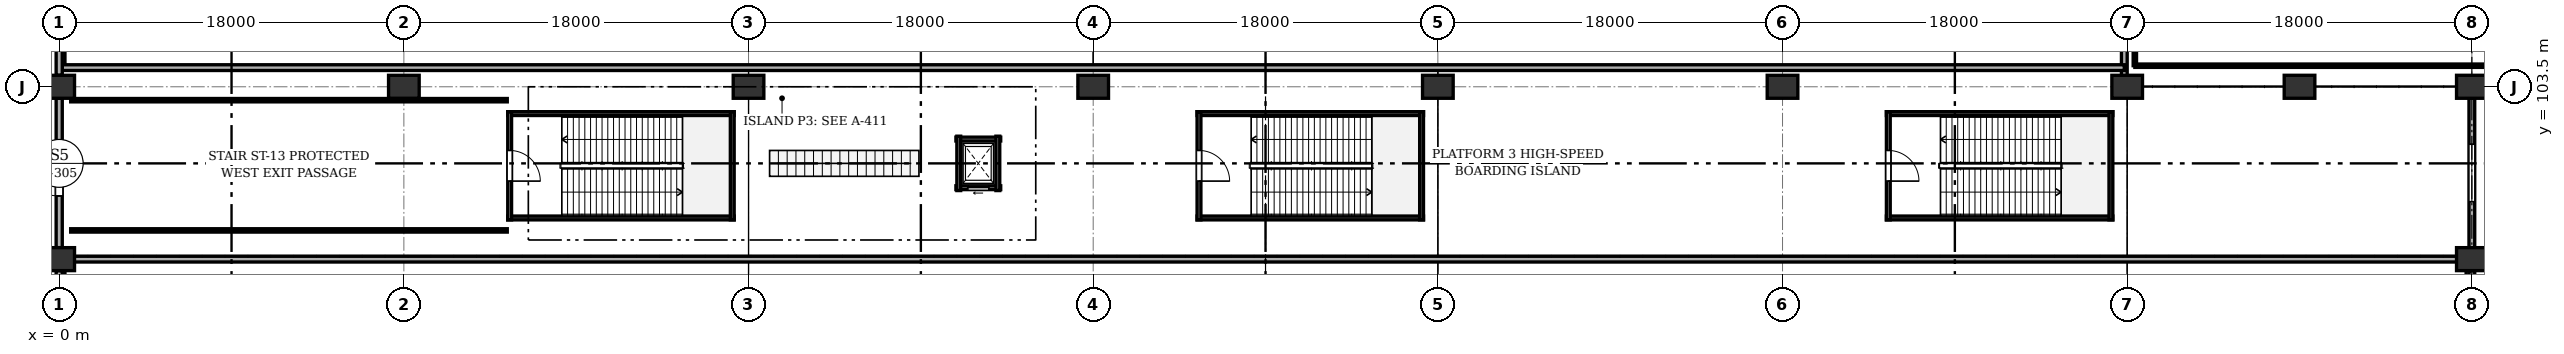
"""IFC4 building model, lengths in metres.
Left out: names, types, materials, properties, quantities, classifications, styles, units other than length and angle.
Written with IfcOpenShell. Run it as: python <this file> out.ifc"""

import sys

from ifc_helpers import new_model, si_unit, direction, frame, frame_2d, origin, origin_2d, place, context, subcontext, project, spatial, rectangle, extrude, element, fill, save


model = new_model("IFC4")
c1 = context("Model", 3, precision=1e-05, world=origin(), true_north=direction((0.0, 1.0)))
c2 = subcontext(c1, "Body", "Model", "MODEL_VIEW")
j1 = project(units=[si_unit("LENGTHUNIT", "METRE"), si_unit("PLANEANGLEUNIT", "RADIAN")], contexts=[c1])
p1 = place(None, origin())
s1 = spatial("IfcSite", under=j1, at=p1, CompositionType="ELEMENT")
p2 = place(p1, origin())
s2 = spatial("IfcBuilding", under=s1, at=p2, CompositionType="ELEMENT")
p3 = place(p2, origin())
s3 = spatial("IfcBuildingStorey", under=s2, at=p3, CompositionType="ELEMENT", Elevation=0.0)
for number, where, z_axis, x_axis in (
    (1, (0.0, 94.5, 0.0), (0.0, 0.0, 1.0), (1.0, 0.0, 0.0)),
    (2, (0.0, 103.5, 0.0), (0.0, 0.0, 1.0), (1.0, 0.0, 0.0)),
    (3, (18.0, 103.5, 0.0), (0.0, 0.0, 1.0), (1.0, 0.0, 0.0)),
    (4, (36.0, 103.5, 0.0), (0.0, 0.0, 1.0), (1.0, 0.0, 0.0)),
    (5, (54.0, 103.5, 0.0), (0.0, 0.0, 1.0), (1.0, 0.0, 0.0)),
    (6, (72.0, 103.5, 0.0), (0.0, 0.0, 1.0), (1.0, 0.0, 0.0)),
    (7, (90.0, 103.5, 0.0), (0.0, 0.0, 1.0), (1.0, 0.0, 0.0)),
    (8, (108.0, 103.5, 0.0), (0.0, 0.0, 1.0), (1.0, 0.0, 0.0)),
    (9, (117.0, 103.5, 0.0), (0.0, 0.0, 1.0), (1.0, 0.0, 0.0)),
    (10, (126.0, 94.5, 0.0), (0.0, 0.0, 1.0), (1.0, 0.0, 0.0)),
    (11, (126.0, 103.5, 0.0), (0.0, 0.0, 1.0), (1.0, 0.0, 0.0)),
):
    element("IfcColumn", number, at=place(p3, frame(where, z_axis=z_axis, x_axis=x_axis)), inside=s3, PredefinedType="COLUMN", context=c2, shape_type="SweptSolid", body=[
        extrude(rectangle(XDim=1.6, YDim=1.2, at=origin_2d()), origin(), (0.0, 0.0, 1.0), 6.6),
    ])
p4 = place(p3, frame((0.15, 76.5, -1.25), z_axis=(0.0, 0.0, 1.0), x_axis=(0.0, 1.0, 0.0)))
e12 = element("IfcWall", 12, at=p4, inside=s3, PredefinedType="SOLIDWALL", context=c2, shape_type="SweptSolid", body=[
    extrude(rectangle(XDim=18.0, YDim=0.3, at=frame_2d((9.0, 0.0))), origin(), (0.0, 0.0, 1.0), 0.52),
])
p5 = place(p3, frame((0.15, 104.5, -1.25), z_axis=(0.0, 0.0, 1.0), x_axis=(0.0, 1.0, 0.0)))
e13 = element("IfcWall", 13, at=p5, inside=s3, PredefinedType="SOLIDWALL", context=c2, shape_type="SweptSolid", body=[
    extrude(rectangle(XDim=4.0, YDim=0.3, at=frame_2d((2.0, 0.0))), origin(), (0.0, 0.0, 1.0), 1.23),
])
p6 = place(p3, frame((125.85, 76.5, -1.25), z_axis=(0.0, 0.0, 1.0), x_axis=(0.0, 1.0, 0.0)))
e14 = element("IfcWall", 14, at=p6, inside=s3, PredefinedType="SOLIDWALL", context=c2, shape_type="SweptSolid", body=[
    extrude(rectangle(XDim=18.0, YDim=0.3, at=frame_2d((9.0, 0.0))), origin(), (0.0, 0.0, 1.0), 0.52),
])
p7 = place(p3, frame((107.85, 103.5, -1.25), z_axis=(0.0, 0.0, 1.0), x_axis=(0.0, 1.0, 0.0)))
e15 = element("IfcWall", 15, at=p7, inside=s3, PredefinedType="SOLIDWALL", context=c2, shape_type="SweptSolid", body=[
    extrude(rectangle(XDim=5.0, YDim=0.3, at=frame_2d((2.5, 0.0))), origin(), (0.0, 0.0, 1.0), 2.5),
])
p8 = place(p3, frame((0.15, 94.5, -1.25), z_axis=(0.0, 0.0, 1.0), x_axis=(1.0, 0.0, 0.0)))
e16 = element("IfcWall", 16, at=p8, inside=s3, PredefinedType="SOLIDWALL", context=c2, shape_type="SweptSolid", body=[
    extrude(rectangle(XDim=125.7, YDim=0.3, at=frame_2d((62.85, 0.0))), origin(), (0.0, 0.0, 1.0), 0.87),
])
p9 = place(p3, frame((0.15, 104.5, -1.25), z_axis=(0.0, 0.0, 1.0), x_axis=(1.0, 0.0, 0.0)))
e17 = element("IfcWall", 17, at=p9, inside=s3, PredefinedType="SOLIDWALL", context=c2, shape_type="SweptSolid", body=[
    extrude(rectangle(XDim=107.7, YDim=0.3, at=frame_2d((53.85, 0.0))), origin(), (0.0, 0.0, 1.0), 0.87),
])
p10 = place(p3, frame((0.0, 86.1, 0.0), z_axis=(0.0, 0.0, 1.0), x_axis=(0.0, 1.0, 0.0)))
e18 = element("IfcWall", 18, at=p10, inside=s3, PredefinedType="SOLIDWALL", context=c2, shape_type="SweptSolid", body=[
    extrude(rectangle(XDim=7.8, YDim=0.32, at=frame_2d((3.9, 0.0))), origin(), (0.0, 0.0, 1.0), 5.495),
])
p11 = place(p10, frame((2.55, 0.0, 0.95)))
e19 = element("IfcOpeningElement", 19, at=p11, cuts=e18, PredefinedType="OPENING", context=c2, shape_type="SweptSolid", body=[
    extrude(rectangle(XDim=2.7, YDim=2.1, at=frame_2d((1.35, 1.05))), frame((0.0, 0.17, 0.0), z_axis=(0.0, -1.0, 0.0), x_axis=(1.0, 0.0, 0.0)), (0.0, 0.0, 1.0), 0.34),
])
p12 = place(p3, frame((0.0, 95.1, 0.0), z_axis=(0.0, 0.0, 1.0), x_axis=(0.0, 1.0, 0.0)))
e20 = element("IfcWall", 20, at=p12, inside=s3, PredefinedType="SOLIDWALL", context=c2, shape_type="SweptSolid", body=[
    extrude(rectangle(XDim=7.8, YDim=0.32, at=frame_2d((3.9, 0.0))), origin(), (0.0, 0.0, 1.0), 5.495),
])
p13 = place(p12, frame((2.7, 0.0, 0.0)))
e21 = element("IfcOpeningElement", 21, at=p13, cuts=e20, PredefinedType="OPENING", context=c2, shape_type="SweptSolid", body=[
    extrude(rectangle(XDim=2.4, YDim=2.5, at=frame_2d((1.2, 1.25))), frame((0.0, 0.17, 0.0), z_axis=(0.0, -1.0, 0.0), x_axis=(1.0, 0.0, 0.0)), (0.0, 0.0, 1.0), 0.34),
])
p14 = place(p3, frame((0.0, 104.1, 0.0), z_axis=(0.0, 0.0, 1.0), x_axis=(0.0, 1.0, 0.0)))
e22 = element("IfcWall", 22, at=p14, inside=s3, PredefinedType="SOLIDWALL", context=c2, shape_type="SweptSolid", body=[
    extrude(rectangle(XDim=12.45, YDim=0.32, at=frame_2d((6.225, 0.0))), origin(), (0.0, 0.0, 1.0), 5.495),
])
p15 = place(p14, frame((3.0, 0.0, 0.95)))
e23 = element("IfcOpeningElement", 23, at=p15, cuts=e22, PredefinedType="OPENING", context=c2, shape_type="SweptSolid", body=[
    extrude(rectangle(XDim=2.4, YDim=2.1, at=frame_2d((1.2, 1.05))), frame((0.0, 0.17, 0.0), z_axis=(0.0, -1.0, 0.0), x_axis=(1.0, 0.0, 0.0)), (0.0, 0.0, 1.0), 0.34),
])
p16 = place(p14, frame((7.15, 0.0, 0.95)))
e24 = element("IfcOpeningElement", 24, at=p16, cuts=e22, PredefinedType="OPENING", context=c2, shape_type="SweptSolid", body=[
    extrude(rectangle(XDim=2.1, YDim=2.0, at=frame_2d((1.05, 1.0))), frame((0.0, 0.17, 0.0), z_axis=(0.0, -1.0, 0.0), x_axis=(1.0, 0.0, 0.0)), (0.0, 0.0, 1.0), 0.34),
])
p17 = place(p3, frame((126.0, 93.9, 0.0), z_axis=(0.0, 0.0, 1.0), x_axis=(0.0, -1.0, 0.0)))
e25 = element("IfcWall", 25, at=p17, inside=s3, PredefinedType="SOLIDWALL", context=c2, shape_type="SweptSolid", body=[
    extrude(rectangle(XDim=7.8, YDim=0.3, at=frame_2d((3.9, 0.0))), origin(), (0.0, 0.0, 1.0), 5.495),
])
p18 = place(p17, frame((3.1, 0.0, 0.95)))
e26 = element("IfcOpeningElement", 26, at=p18, cuts=e25, PredefinedType="OPENING", context=c2, shape_type="SweptSolid", body=[
    extrude(rectangle(XDim=1.6, YDim=1.9, at=frame_2d((0.8, 0.95))), frame((0.0, 0.16, 0.0), z_axis=(0.0, -1.0, 0.0), x_axis=(1.0, 0.0, 0.0)), (0.0, 0.0, 1.0), 0.32),
])
p19 = place(p3, frame((126.0, 102.9, 0.0), z_axis=(0.0, 0.0, 1.0), x_axis=(0.0, -1.0, 0.0)))
e27 = element("IfcWall", 27, at=p19, inside=s3, PredefinedType="SOLIDWALL", context=c2, shape_type="SweptSolid", body=[
    extrude(rectangle(XDim=7.8, YDim=0.3, at=frame_2d((3.9, 0.0))), origin(), (0.0, 0.0, 1.0), 5.495),
])
p20 = place(p19, frame((2.4, 0.0, 0.95)))
e28 = element("IfcOpeningElement", 28, at=p20, cuts=e27, PredefinedType="OPENING", context=c2, shape_type="SweptSolid", body=[
    extrude(rectangle(XDim=3.0, YDim=2.1, at=frame_2d((1.5, 1.05))), frame((0.0, 0.16, 0.0), z_axis=(0.0, -1.0, 0.0), x_axis=(1.0, 0.0, 0.0)), (0.0, 0.0, 1.0), 0.32),
])
for number, where, z_axis, x_axis in (
    (29, (23.425, 96.65, 0.0), (0.0, 0.0, 1.0), (1.0, 0.0, 0.0)),
    (30, (35.25, 102.1, 0.0), (0.0, 0.0, 1.0), (-1.0, 0.0, 0.0)),
):
    element("IfcWall", number, at=place(p3, frame(where, z_axis=z_axis, x_axis=x_axis)), inside=s3, PredefinedType="SOLIDWALL", context=c2, shape_type="SweptSolid", body=[
        extrude(rectangle(XDim=11.825, YDim=0.2, at=frame_2d((5.913, 0.0))), origin(), (0.0, 0.0, 1.0), 6.32),
    ])
p21 = place(p3, frame((35.15, 96.55, 0.0), z_axis=(0.0, 0.0, 1.0), x_axis=(0.0, 1.0, 0.0)))
e31 = element("IfcWall", 31, at=p21, inside=s3, PredefinedType="SOLIDWALL", context=c2, shape_type="SweptSolid", body=[
    extrude(rectangle(XDim=5.65, YDim=0.2, at=frame_2d((2.825, 0.0))), origin(), (0.0, 0.0, 1.0), 6.32),
])
p22 = place(p3, frame((23.525, 102.2, 0.0), z_axis=(0.0, 0.0, 1.0), x_axis=(0.0, -1.0, 0.0)))
e32 = element("IfcWall", 32, at=p22, inside=s3, PredefinedType="SOLIDWALL", context=c2, shape_type="SweptSolid", body=[
    extrude(rectangle(XDim=5.65, YDim=0.2, at=frame_2d((2.825, 0.0))), origin(), (0.0, 0.0, 1.0), 4.4),
])
p23 = place(p22, frame((2.025, 0.0, 0.0)))
e33 = element("IfcOpeningElement", 33, at=p23, cuts=e32, PredefinedType="OPENING", context=c2, shape_type="SweptSolid", body=[
    extrude(rectangle(XDim=1.6, YDim=2.15, at=frame_2d((0.8, 1.075))), frame((0.0, 0.11, 0.0), z_axis=(0.0, -1.0, 0.0), x_axis=(1.0, 0.0, 0.0)), (0.0, 0.0, 1.0), 0.22),
])
for number, where, z_axis, x_axis in (
    (34, (59.425, 96.65, 0.0), (0.0, 0.0, 1.0), (1.0, 0.0, 0.0)),
    (35, (71.25, 102.1, 0.0), (0.0, 0.0, 1.0), (-1.0, 0.0, 0.0)),
):
    element("IfcWall", number, at=place(p3, frame(where, z_axis=z_axis, x_axis=x_axis)), inside=s3, PredefinedType="SOLIDWALL", context=c2, shape_type="SweptSolid", body=[
        extrude(rectangle(XDim=11.825, YDim=0.2, at=frame_2d((5.913, 0.0))), origin(), (0.0, 0.0, 1.0), 6.32),
    ])
p24 = place(p3, frame((71.15, 96.55, 0.0), z_axis=(0.0, 0.0, 1.0), x_axis=(0.0, 1.0, 0.0)))
e36 = element("IfcWall", 36, at=p24, inside=s3, PredefinedType="SOLIDWALL", context=c2, shape_type="SweptSolid", body=[
    extrude(rectangle(XDim=5.65, YDim=0.2, at=frame_2d((2.825, 0.0))), origin(), (0.0, 0.0, 1.0), 6.32),
])
p25 = place(p3, frame((59.525, 102.2, 0.0), z_axis=(0.0, 0.0, 1.0), x_axis=(0.0, -1.0, 0.0)))
e37 = element("IfcWall", 37, at=p25, inside=s3, PredefinedType="SOLIDWALL", context=c2, shape_type="SweptSolid", body=[
    extrude(rectangle(XDim=5.65, YDim=0.2, at=frame_2d((2.825, 0.0))), origin(), (0.0, 0.0, 1.0), 4.4),
])
p26 = place(p25, frame((2.025, 0.0, 0.0)))
e38 = element("IfcOpeningElement", 38, at=p26, cuts=e37, PredefinedType="OPENING", context=c2, shape_type="SweptSolid", body=[
    extrude(rectangle(XDim=1.6, YDim=2.15, at=frame_2d((0.8, 1.075))), frame((0.0, 0.11, 0.0), z_axis=(0.0, -1.0, 0.0), x_axis=(1.0, 0.0, 0.0)), (0.0, 0.0, 1.0), 0.22),
])
for number, where, z_axis, x_axis in (
    (39, (95.425, 96.65, 0.0), (0.0, 0.0, 1.0), (1.0, 0.0, 0.0)),
    (40, (107.25, 102.1, 0.0), (0.0, 0.0, 1.0), (-1.0, 0.0, 0.0)),
):
    element("IfcWall", number, at=place(p3, frame(where, z_axis=z_axis, x_axis=x_axis)), inside=s3, PredefinedType="SOLIDWALL", context=c2, shape_type="SweptSolid", body=[
        extrude(rectangle(XDim=11.825, YDim=0.2, at=frame_2d((5.913, 0.0))), origin(), (0.0, 0.0, 1.0), 6.32),
    ])
p27 = place(p3, frame((107.15, 96.55, 0.0), z_axis=(0.0, 0.0, 1.0), x_axis=(0.0, 1.0, 0.0)))
e41 = element("IfcWall", 41, at=p27, inside=s3, PredefinedType="SOLIDWALL", context=c2, shape_type="SweptSolid", body=[
    extrude(rectangle(XDim=5.65, YDim=0.2, at=frame_2d((2.825, 0.0))), origin(), (0.0, 0.0, 1.0), 6.32),
])
p28 = place(p3, frame((95.525, 102.2, 0.0), z_axis=(0.0, 0.0, 1.0), x_axis=(0.0, -1.0, 0.0)))
e42 = element("IfcWall", 42, at=p28, inside=s3, PredefinedType="SOLIDWALL", context=c2, shape_type="SweptSolid", body=[
    extrude(rectangle(XDim=5.65, YDim=0.2, at=frame_2d((2.825, 0.0))), origin(), (0.0, 0.0, 1.0), 4.4),
])
p29 = place(p28, frame((2.025, 0.0, 0.0)))
e43 = element("IfcOpeningElement", 43, at=p29, cuts=e42, PredefinedType="OPENING", context=c2, shape_type="SweptSolid", body=[
    extrude(rectangle(XDim=1.6, YDim=2.15, at=frame_2d((0.8, 1.075))), frame((0.0, 0.11, 0.0), z_axis=(0.0, -1.0, 0.0), x_axis=(1.0, 0.0, 0.0)), (0.0, 0.0, 1.0), 0.22),
])
p30 = place(p3, frame((46.83, 98.23, 0.0), z_axis=(0.0, 0.0, 1.0), x_axis=(1.0, 0.0, 0.0)))
e44 = element("IfcWall", 44, at=p30, inside=s3, PredefinedType="SOLIDWALL", context=c2, shape_type="SweptSolid", body=[
    extrude(rectangle(XDim=2.34, YDim=0.2, at=frame_2d((1.17, 0.0))), origin(), (0.0, 0.0, 1.0), 4.4),
])
p31 = place(p30, frame((0.62, 0.0, 0.0)))
e45 = element("IfcOpeningElement", 45, at=p31, cuts=e44, PredefinedType="OPENING", context=c2, shape_type="SweptSolid", body=[
    extrude(rectangle(XDim=1.1, YDim=2.15, at=frame_2d((0.55, 1.075))), frame((0.0, 0.11, 0.0), z_axis=(0.0, -1.0, 0.0), x_axis=(1.0, 0.0, 0.0)), (0.0, 0.0, 1.0), 0.22),
])
p32 = place(p3, frame((49.17, 100.77, 0.0), z_axis=(0.0, 0.0, 1.0), x_axis=(-1.0, 0.0, 0.0)))
e46 = element("IfcWall", 46, at=p32, inside=s3, PredefinedType="SOLIDWALL", context=c2, shape_type="SweptSolid", body=[
    extrude(rectangle(XDim=2.34, YDim=0.2, at=frame_2d((1.17, 0.0))), origin(), (0.0, 0.0, 1.0), 4.4),
])
for number, where, z_axis, x_axis in (
    (47, (46.98, 100.92, 0.0), (0.0, 0.0, 1.0), (0.0, -1.0, 0.0)),
    (48, (49.02, 98.08, 0.0), (0.0, 0.0, 1.0), (0.0, 1.0, 0.0)),
):
    element("IfcWall", number, at=place(p3, frame(where, z_axis=z_axis, x_axis=x_axis)), inside=s3, PredefinedType="SOLIDWALL", context=c2, shape_type="SweptSolid", body=[
        extrude(rectangle(XDim=2.84, YDim=0.2, at=frame_2d((1.42, 0.0))), origin(), (0.0, 0.0, 1.0), 4.4),
    ])
for number, where, z_axis, x_axis in (
    (49, (23.4, 96.0, 0.0), (0.0, 0.0, 1.0), (-1.0, 0.0, 0.0)),
    (50, (0.6, 102.8, 0.0), (0.0, 0.0, 1.0), (1.0, 0.0, 0.0)),
):
    element("IfcWall", number, at=place(p3, frame(where, z_axis=z_axis, x_axis=x_axis)), inside=s3, PredefinedType="PARTITIONING", context=c2, shape_type="SweptSolid", body=[
        extrude(rectangle(XDim=22.8, YDim=0.175, at=frame_2d((11.4, 0.0))), origin(), (0.0, 0.0, 1.0), 4.4),
    ])
p33 = place(p3, frame((135.4, 104.6, 0.0), z_axis=(0.0, 0.0, 1.0), x_axis=(-1.0, 0.0, 0.0)))
e51 = element("IfcWall", 51, at=p33, inside=s3, PredefinedType="PARTITIONING", context=c2, shape_type="SweptSolid", body=[
    extrude(rectangle(XDim=27.0, YDim=0.175, at=frame_2d((13.5, 0.0))), origin(), (0.0, 0.0, 1.0), 4.4),
])
p34 = place(p3, frame((108.4, 104.6, 0.0), z_axis=(0.0, 0.0, 1.0), x_axis=(0.0, 1.0, 0.0)))
e52 = element("IfcWall", 52, at=p34, inside=s3, PredefinedType="PARTITIONING", context=c2, shape_type="SweptSolid", body=[
    extrude(rectangle(XDim=20.8, YDim=0.175, at=frame_2d((10.4, 0.0))), origin(), (0.0, 0.0, 1.0), 4.4),
])
p35 = place(p13, origin())
e53 = element("IfcDoor", 53, at=p35, inside=s3, OperationType="SINGLE_SWING_RIGHT", PredefinedType="DOOR", context=c2, shape_type="SweptSolid", body=[
    extrude(rectangle(XDim=2.4, YDim=2.5, at=frame_2d((1.2, 1.25))), frame((0.0, 0.025, 0.0), z_axis=(0.0, -1.0, 0.0), x_axis=(1.0, 0.0, 0.0)), (0.0, 0.0, 1.0), 0.05),
])
fill(e21, e53)
p36 = place(p20, origin())
e54 = element("IfcWindow", 54, at=p36, inside=s3, PartitioningType="SINGLE_PANEL", PredefinedType="WINDOW", context=c2, shape_type="SweptSolid", body=[
    extrude(rectangle(XDim=3.0, YDim=2.1, at=frame_2d((1.5, 1.05))), frame((0.0, 0.03, 0.0), z_axis=(0.0, -1.0, 0.0), x_axis=(1.0, 0.0, 0.0)), (0.0, 0.0, 1.0), 0.06),
])
fill(e28, e54)
p37 = place(p23, origin())
e55 = element("IfcDoor", 55, at=p37, inside=s3, OperationType="SINGLE_SWING_RIGHT", PredefinedType="DOOR", context=c2, shape_type="SweptSolid", body=[
    extrude(rectangle(XDim=1.6, YDim=2.15, at=frame_2d((0.8, 1.075))), frame((0.0, 0.025, 0.0), z_axis=(0.0, -1.0, 0.0), x_axis=(1.0, 0.0, 0.0)), (0.0, 0.0, 1.0), 0.05),
])
fill(e33, e55)
p38 = place(p26, origin())
e56 = element("IfcDoor", 56, at=p38, inside=s3, OperationType="SINGLE_SWING_RIGHT", PredefinedType="DOOR", context=c2, shape_type="SweptSolid", body=[
    extrude(rectangle(XDim=1.6, YDim=2.15, at=frame_2d((0.8, 1.075))), frame((0.0, 0.025, 0.0), z_axis=(0.0, -1.0, 0.0), x_axis=(1.0, 0.0, 0.0)), (0.0, 0.0, 1.0), 0.05),
])
fill(e38, e56)
p39 = place(p29, origin())
e57 = element("IfcDoor", 57, at=p39, inside=s3, OperationType="SINGLE_SWING_RIGHT", PredefinedType="DOOR", context=c2, shape_type="SweptSolid", body=[
    extrude(rectangle(XDim=1.6, YDim=2.15, at=frame_2d((0.8, 1.075))), frame((0.0, 0.025, 0.0), z_axis=(0.0, -1.0, 0.0), x_axis=(1.0, 0.0, 0.0)), (0.0, 0.0, 1.0), 0.05),
])
fill(e43, e57)
p40 = place(p31, origin())
e58 = element("IfcDoor", 58, at=p40, inside=s3, OperationType="SLIDING_TO_LEFT", PredefinedType="DOOR", context=c2, shape_type="SweptSolid", body=[
    extrude(rectangle(XDim=1.1, YDim=2.15, at=frame_2d((0.55, 1.075))), frame((0.0, 0.025, 0.0), z_axis=(0.0, -1.0, 0.0), x_axis=(1.0, 0.0, 0.0)), (0.0, 0.0, 1.0), 0.05),
])
fill(e45, e58)
save(model, sys.argv[1])
